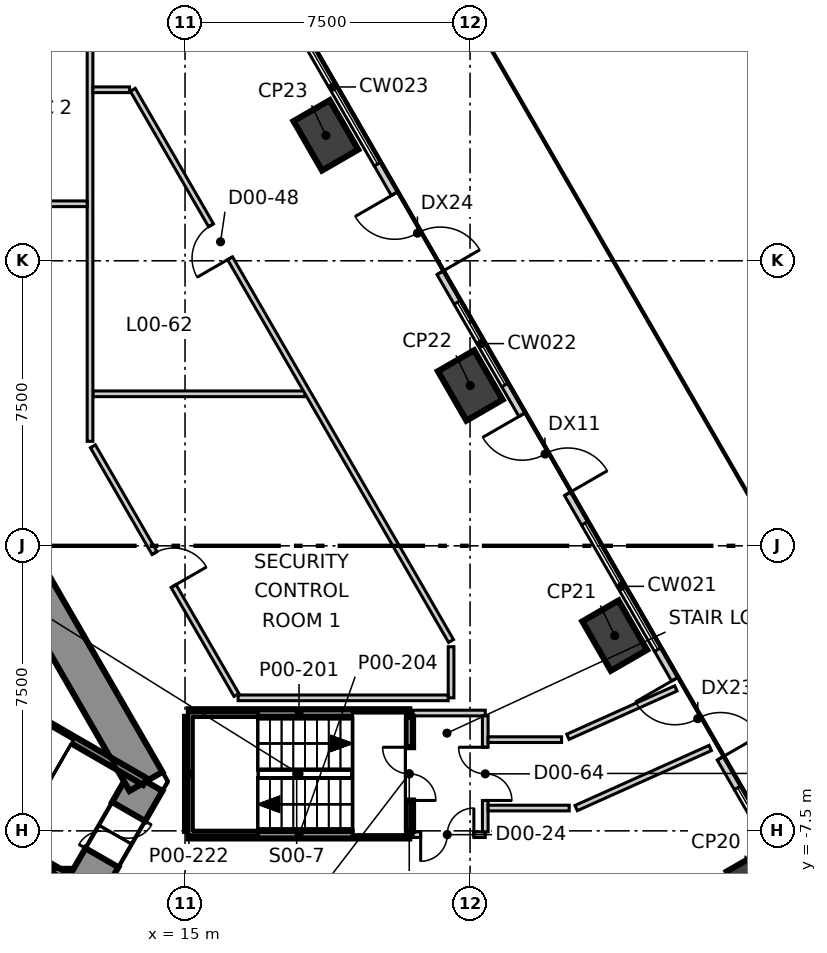
"""IFC4 building model, lengths in metres.
Left out: names, types, materials, properties, quantities, classifications, styles, units other than length and angle.
Written with IfcOpenShell. Run it as: python <this file> out.ifc"""

import sys

from ifc_helpers import new_model, si_unit, direction, frame, frame_2d, origin, origin_2d, place, context, subcontext, project, spatial, polyline, rectangle, outline, extrude, element, fill, save


model = new_model("IFC4")
c1 = context("Model", 3, precision=1e-05, world=origin(), true_north=direction((0.0, 1.0)))
c2 = subcontext(c1, "Body", "Model", "MODEL_VIEW")
j1 = project(units=[si_unit("LENGTHUNIT", "METRE"), si_unit("PLANEANGLEUNIT", "RADIAN")], contexts=[c1])
p1 = place(None, origin())
s1 = spatial("IfcSite", under=j1, at=p1, CompositionType="ELEMENT")
p2 = place(p1, origin())
s2 = spatial("IfcBuilding", under=s1, at=p2, CompositionType="ELEMENT")
p3 = place(p2, origin())
s3 = spatial("IfcBuildingStorey", under=s2, at=p3, CompositionType="ELEMENT", Elevation=0.0)
p4 = place(p3, frame((-12.355, -9.0, -0.4), z_axis=(0.0, 0.0, 1.0), x_axis=(1.0, 0.0, 0.0)))
e1 = element("IfcWall", 1, at=p4, inside=s3, PredefinedType="SHEAR", context=c2, shape_type="SweptSolid", body=[
    extrude(outline(polyline([(-0.289, -0.5), (1.656, -0.5), (3.601, -0.5), (5.547, -0.5), (7.492, -0.5), (9.437, -0.5), (11.382, -0.5), (13.328, -0.5), (15.273, -0.5), (17.218, -0.5), (19.163, -0.5), (21.109, -0.5), (23.054, -0.5), (24.999, -0.5), (24.422, 0.5), (22.566, 0.5), (20.709, 0.5), (18.853, 0.5), (16.996, 0.5), (15.14, 0.5), (13.283, 0.5), (11.427, 0.5), (9.57, 0.5), (7.714, 0.5), (5.857, 0.5), (4.001, 0.5), (2.145, 0.5), (0.288, 0.5), (-0.289, -0.5)])), origin(), (0.0, 0.0, 1.0), 8.5),
])
p5 = place(p3, frame((12.355, -9.0, -0.4), z_axis=(0.0, 0.0, 1.0), x_axis=(0.500077567175, 0.865980615723, 0.0)))
e2 = element("IfcWall", 2, at=p5, inside=s3, PredefinedType="SHEAR", context=c2, shape_type="SweptSolid", body=[
    extrude(outline(polyline([(-0.288, -0.5), (1.617, -0.5), (3.522, -0.5), (2.945, 0.5), (1.617, 0.5), (0.289, 0.499), (-0.288, -0.5)])), origin(), (0.0, 0.0, 1.0), 8.5),
])
p6 = place(p5, frame((0.917, 0.0, 0.4)))
e3 = element("IfcOpeningElement", 3, at=p6, cuts=e2, PredefinedType="OPENING", context=c2, shape_type="SweptSolid", body=[
    extrude(rectangle(XDim=1.4, YDim=2.1, at=frame_2d((0.7, 1.05))), frame((0.0, 0.51, 0.0), z_axis=(0.0, -1.0, 0.0), x_axis=(1.0, 0.0, 0.0)), (0.0, 0.0, 1.0), 1.02),
])
p7 = place(p3, frame((13.972, -6.2, -0.4), z_axis=(0.0, 0.0, 1.0), x_axis=(-0.499992141631, 0.866029940768, 0.0)))
e4 = element("IfcWall", 4, at=p7, inside=s3, PredefinedType="SHEAR", context=c2, shape_type="SweptSolid", body=[
    extrude(outline(polyline([(-0.288, -0.5), (1.657, -0.5), (3.602, -0.5), (5.547, -0.5), (7.493, -0.5), (9.438, -0.5), (11.383, -0.5), (13.328, -0.5), (15.273, -0.5), (17.218, -0.499), (19.164, -0.499), (21.109, -0.499), (23.054, -0.499), (24.999, -0.499), (24.422, 0.5), (22.566, 0.5), (20.709, 0.5), (18.853, 0.5), (16.996, 0.5), (15.14, 0.5), (13.283, 0.5), (11.427, 0.5), (9.57, 0.5), (7.714, 0.5), (5.857, 0.5), (4.001, 0.5), (2.145, 0.5), (0.288, 0.5), (-0.288, -0.5)])), origin(), (0.0, 0.0, 1.0), 8.5),
])
p8 = place(p7, frame((11.455, 0.0, 0.4)))
e5 = element("IfcOpeningElement", 5, at=p8, cuts=e4, PredefinedType="OPENING", context=c2, shape_type="SweptSolid", body=[
    extrude(rectangle(XDim=1.8, YDim=2.1, at=frame_2d((0.9, 1.05))), frame((0.0, 0.51, 0.0), z_axis=(0.0, -1.0, 0.0), x_axis=(1.0, 0.0, 0.0)), (0.0, 0.0, 1.0), 1.02),
])
for number, where, z_axis, x_axis in (
    (6, (30.105, -8.944, -0.4), (0.0, 0.0, 1.0), (-0.5, 0.866, 0.0)),
    (7, (26.306, -2.363, -0.4), (0.0, 0.0, 1.0), (-0.5, 0.866, 0.0)),
    (8, (22.506, 4.219, -0.4), (0.0, 0.0, 1.0), (-0.5, 0.866, 0.0)),
    (9, (18.706, 10.8, -0.4), (0.0, 0.0, 1.0), (-0.5, 0.866, 0.0)),
):
    element("IfcColumn", number, at=place(p3, frame(where, z_axis=z_axis, x_axis=x_axis)), inside=s3, PredefinedType="COLUMN", context=c2, shape_type="SweptSolid", body=[
        extrude(rectangle(XDim=1.5, YDim=1.1, at=origin_2d()), origin(), (0.0, 0.0, 1.0), 8.5),
    ])
p9 = place(p3, frame((29.541, -6.366, 0.0), z_axis=(0.0, 0.0, 1.0), x_axis=(-0.499952208475, 0.866052994476, 0.0)))
e10 = element("IfcWall", 10, at=p9, inside=s3, PredefinedType="ELEMENTEDWALL", context=c2, shape_type="SweptSolid", body=[
    extrude(rectangle(XDim=4.201, YDim=0.2, at=frame_2d((2.1, 0.0))), origin(), (0.0, 0.0, 1.0), 8.1),
])
p10 = place(p9, frame((0.9, 0.0, 0.0)))
e11 = element("IfcOpeningElement", 11, at=p10, cuts=e10, PredefinedType="OPENING", context=c2, shape_type="SweptSolid", body=[
    extrude(rectangle(XDim=2.4, YDim=3.2, at=frame_2d((1.2, 1.6))), frame((0.0, 0.11, 0.0), z_axis=(0.0, -1.0, 0.0), x_axis=(1.0, 0.0, 0.0)), (0.0, 0.0, 1.0), 0.22),
])
p11 = place(p3, frame((25.522, 0.595, 0.0), z_axis=(0.0, 0.0, 1.0), x_axis=(-0.499908613451, 0.866078159404, 0.0)))
e12 = element("IfcWall", 12, at=p11, inside=s3, PredefinedType="ELEMENTEDWALL", context=c2, shape_type="SweptSolid", body=[
    extrude(rectangle(XDim=4.2, YDim=0.2, at=frame_2d((2.1, 0.0))), origin(), (0.0, 0.0, 1.0), 8.1),
])
p12 = place(p11, frame((0.9, 0.0, 0.0)))
e13 = element("IfcOpeningElement", 13, at=p12, cuts=e12, PredefinedType="OPENING", context=c2, shape_type="SweptSolid", body=[
    extrude(rectangle(XDim=2.4, YDim=3.2, at=frame_2d((1.2, 1.6))), frame((0.0, 0.11, 0.0), z_axis=(0.0, -1.0, 0.0), x_axis=(1.0, 0.0, 0.0)), (0.0, 0.0, 1.0), 0.22),
])
p13 = place(p3, frame((22.166, 6.408, 0.0), z_axis=(0.0, 0.0, 1.0), x_axis=(-0.500052886544, 0.865994867571, 0.0)))
e14 = element("IfcWall", 14, at=p13, inside=s3, PredefinedType="ELEMENTEDWALL", context=c2, shape_type="SweptSolid", body=[
    extrude(rectangle(XDim=4.2, YDim=0.2, at=frame_2d((2.1, 0.0))), origin(), (0.0, 0.0, 1.0), 8.1),
])
p14 = place(p13, frame((0.9, 0.0, 0.0)))
e15 = element("IfcOpeningElement", 15, at=p14, cuts=e14, PredefinedType="OPENING", context=c2, shape_type="SweptSolid", body=[
    extrude(rectangle(XDim=2.4, YDim=3.2, at=frame_2d((1.2, 1.6))), frame((0.0, 0.11, 0.0), z_axis=(0.0, -1.0, 0.0), x_axis=(1.0, 0.0, 0.0)), (0.0, 0.0, 1.0), 0.22),
])
p15 = place(p3, frame((21.0, -7.6, 0.0), z_axis=(0.0, 0.0, 1.0), x_axis=(1.0, 0.0, 0.0)))
e16 = element("IfcWall", 16, at=p15, inside=s3, PredefinedType="PARTITIONING", context=c2, shape_type="SweptSolid", body=[
    extrude(rectangle(XDim=1.9, YDim=0.15, at=frame_2d((0.95, 0.0))), origin(), (0.0, 0.0, 1.0), 8.1),
])
p16 = place(p15, frame((0.2, 0.0, 0.0)))
e17 = element("IfcOpeningElement", 17, at=p16, cuts=e16, PredefinedType="OPENING", context=c2, shape_type="SweptSolid", body=[
    extrude(rectangle(XDim=1.4, YDim=2.1, at=frame_2d((0.7, 1.05))), frame((0.0, 0.085, 0.0), z_axis=(0.0, -1.0, 0.0), x_axis=(1.0, 0.0, 0.0)), (0.0, 0.0, 1.0), 0.17),
])
p17 = place(p3, frame((21.0, -4.4, 0.0), z_axis=(0.0, 0.0, 1.0), x_axis=(1.0, 0.0, 0.0)))
e18 = element("IfcWall", 18, at=p17, inside=s3, PredefinedType="PARTITIONING", context=c2, shape_type="SweptSolid", body=[
    extrude(rectangle(XDim=1.9, YDim=0.15, at=frame_2d((0.95, 0.0))), origin(), (0.0, 0.0, 1.0), 8.1),
])
p18 = place(p3, frame((22.9, -7.525, 0.0), z_axis=(0.0, 0.0, 1.0), x_axis=(0.0, 1.0, 0.0)))
e19 = element("IfcWall", 19, at=p18, inside=s3, PredefinedType="PARTITIONING", context=c2, shape_type="SweptSolid", body=[
    extrude(rectangle(XDim=3.05, YDim=0.15, at=frame_2d((1.525, 0.0))), origin(), (0.0, 0.0, 1.0), 8.1),
])
p19 = place(p18, frame((0.825, 0.0, 0.0)))
e20 = element("IfcOpeningElement", 20, at=p19, cuts=e19, PredefinedType="OPENING", context=c2, shape_type="SweptSolid", body=[
    extrude(rectangle(XDim=1.4, YDim=2.1, at=frame_2d((0.7, 1.05))), frame((0.0, 0.085, 0.0), z_axis=(0.0, -1.0, 0.0), x_axis=(1.0, 0.0, 0.0)), (0.0, 0.0, 1.0), 0.17),
])
p20 = place(p3, frame((25.292, -6.9, 0.0), z_axis=(0.0, 0.0, 1.0), x_axis=(0.912623058069, 0.408802096229, 0.0)))
e21 = element("IfcWall", 21, at=p20, inside=s3, PredefinedType="PARTITIONING", context=c2, shape_type="SweptSolid", body=[
    extrude(rectangle(XDim=3.867, YDim=0.15, at=frame_2d((1.934, 0.0))), origin(), (0.0, 0.0, 1.0), 8.1),
])
p21 = place(p3, frame((22.975, -6.9, 0.0), z_axis=(0.0, 0.0, 1.0), x_axis=(1.0, 0.0, 0.0)))
e22 = element("IfcWall", 22, at=p21, inside=s3, PredefinedType="PARTITIONING", context=c2, shape_type="SweptSolid", body=[
    extrude(rectangle(XDim=2.134, YDim=0.15, at=frame_2d((1.067, 0.0))), origin(), (0.0, 0.0, 1.0), 8.1),
])
p22 = place(p3, frame((22.975, -5.1, 0.0), z_axis=(0.0, 0.0, 1.0), x_axis=(1.0, 0.0, 0.0)))
e23 = element("IfcWall", 23, at=p22, inside=s3, PredefinedType="PARTITIONING", context=c2, shape_type="SweptSolid", body=[
    extrude(rectangle(XDim=1.933, YDim=0.15, at=frame_2d((0.966, 0.0))), origin(), (0.0, 0.0, 1.0), 8.1),
])
p23 = place(p3, frame((25.075, -5.025, 0.0), z_axis=(0.0, 0.0, 1.0), x_axis=(0.912585012315, 0.408887020212, 0.0)))
e24 = element("IfcWall", 24, at=p23, inside=s3, PredefinedType="PARTITIONING", context=c2, shape_type="SweptSolid", body=[
    extrude(rectangle(XDim=3.113, YDim=0.15, at=frame_2d((1.557, 0.0))), origin(), (0.0, 0.0, 1.0), 8.1),
])
p24 = place(p3, frame((12.575, 4.0, 0.0), z_axis=(0.0, 0.0, 1.0), x_axis=(1.0, 0.0, 0.0)))
e25 = element("IfcWall", 25, at=p24, inside=s3, PredefinedType="PARTITIONING", context=c2, shape_type="SweptSolid", body=[
    extrude(rectangle(XDim=5.583, YDim=0.15, at=frame_2d((2.792, 0.0))), origin(), (0.0, 0.0, 1.0), 8.1),
])
p25 = place(p3, frame((12.5, 2.749, 0.0), z_axis=(0.0, 0.0, 1.0), x_axis=(0.0, 1.0, 0.0)))
e26 = element("IfcWall", 26, at=p25, inside=s3, PredefinedType="PARTITIONING", context=c2, shape_type="SweptSolid", body=[
    extrude(rectangle(XDim=11.2, YDim=0.15, at=frame_2d((5.6, 0.0))), origin(), (0.0, 0.0, 1.0), 8.1),
])
p26 = place(p3, frame((13.625, 12.0, 0.0), z_axis=(0.0, 0.0, 1.0), x_axis=(0.500026956598, -0.866009839826, 0.0)))
e27 = element("IfcWall", 27, at=p26, inside=s3, PredefinedType="PARTITIONING", context=c2, shape_type="SweptSolid", body=[
    extrude(rectangle(XDim=16.749, YDim=0.15, at=frame_2d((8.375, 0.0))), origin(), (0.0, 0.0, 1.0), 8.1),
])
p27 = place(p26, frame((4.119, 0.0, 0.0)))
e28 = element("IfcOpeningElement", 28, at=p27, cuts=e27, PredefinedType="OPENING", context=c2, shape_type="SweptSolid", body=[
    extrude(rectangle(XDim=1.0, YDim=2.1, at=frame_2d((0.5, 1.05))), frame((0.0, 0.085, 0.0), z_axis=(0.0, -1.0, 0.0), x_axis=(1.0, 0.0, 0.0)), (0.0, 0.0, 1.0), 0.17),
])
p28 = place(p3, frame((22.0, -4.0, 0.0), z_axis=(0.0, 0.0, 1.0), x_axis=(0.0, 1.0, 0.0)))
e29 = element("IfcWall", 29, at=p28, inside=s3, PredefinedType="PARTITIONING", context=c2, shape_type="SweptSolid", body=[
    extrude(rectangle(XDim=1.345, YDim=0.15, at=frame_2d((0.672, 0.0))), origin(), (0.0, 0.0, 1.0), 8.1),
])
p29 = place(p3, frame((16.397, -4.0, 0.0), z_axis=(0.0, 0.0, 1.0), x_axis=(1.0, 0.0, 0.0)))
e30 = element("IfcWall", 30, at=p29, inside=s3, PredefinedType="PARTITIONING", context=c2, shape_type="SweptSolid", body=[
    extrude(rectangle(XDim=5.528, YDim=0.15, at=frame_2d((2.764, 0.0))), origin(), (0.0, 0.0, 1.0), 8.1),
])
p30 = place(p3, frame((12.575, 2.619, 0.0), z_axis=(0.0, 0.0, 1.0), x_axis=(0.499992812315, -0.866029553557, 0.0)))
e31 = element("IfcWall", 31, at=p30, inside=s3, PredefinedType="PARTITIONING", context=c2, shape_type="SweptSolid", body=[
    extrude(rectangle(XDim=7.556, YDim=0.15, at=frame_2d((3.778, 0.0))), origin(), (0.0, 0.0, 1.0), 8.1),
])
p31 = place(p30, frame((3.246, 0.0, 0.0)))
e32 = element("IfcOpeningElement", 32, at=p31, cuts=e31, PredefinedType="OPENING", context=c2, shape_type="SweptSolid", body=[
    extrude(rectangle(XDim=1.0, YDim=2.1, at=frame_2d((0.5, 1.05))), frame((0.0, 0.085, 0.0), z_axis=(0.0, -1.0, 0.0), x_axis=(1.0, 0.0, 0.0)), (0.0, 0.0, 1.0), 0.17),
])
p32 = place(p3, frame((8.978, 9.0, 0.0), z_axis=(0.0, 0.0, 1.0), x_axis=(1.0, 0.0, 0.0)))
e33 = element("IfcWall", 33, at=p32, inside=s3, PredefinedType="PARTITIONING", context=c2, shape_type="SweptSolid", body=[
    extrude(rectangle(XDim=3.447, YDim=0.15, at=frame_2d((1.724, 0.0))), origin(), (0.0, 0.0, 1.0), 8.1),
])
p33 = place(p3, frame((12.575, 12.0, 0.0), z_axis=(0.0, 0.0, 1.0), x_axis=(1.0, 0.0, 0.0)))
e34 = element("IfcWall", 34, at=p33, inside=s3, PredefinedType="PARTITIONING", context=c2, shape_type="SweptSolid", body=[
    extrude(rectangle(XDim=0.964, YDim=0.15, at=frame_2d((0.482, 0.0))), origin(), (0.0, 0.0, 1.0), 8.1),
])
p34 = place(p3, frame((6.529, -1.922, 0.0), z_axis=(0.0, 0.0, 1.0), x_axis=(0.866036527536, -0.499980732602, 0.0)))
e35 = element("IfcWall", 35, at=p34, inside=s3, PredefinedType="SOLIDWALL", context=c2, shape_type="SweptSolid", body=[
    extrude(rectangle(XDim=8.564, YDim=0.2, at=frame_2d((4.282, 0.0))), origin(), (0.0, 0.0, 1.0), 8.1),
])
p35 = place(p3, frame((4.929, -4.693, 0.0), z_axis=(0.0, 0.0, 1.0), x_axis=(0.865987152174, -0.50006624788, 0.0)))
e36 = element("IfcWall", 36, at=p35, inside=s3, PredefinedType="SOLIDWALL", context=c2, shape_type="SweptSolid", body=[
    extrude(rectangle(XDim=8.565, YDim=0.2, at=frame_2d((4.282, 0.0))), origin(), (0.0, 0.0, 1.0), 8.1),
])
for number, where, z_axis, x_axis in (
    (37, (15.1, -4.4, 0.0), (0.0, 0.0, 1.0), (1.0, 0.0, 0.0)),
    (38, (15.1, -7.6, 0.0), (0.0, 0.0, 1.0), (1.0, 0.0, 0.0)),
):
    element("IfcWall", number, at=place(p3, frame(where, z_axis=z_axis, x_axis=x_axis)), inside=s3, PredefinedType="SOLIDWALL", context=c2, shape_type="SweptSolid", body=[
        extrude(rectangle(XDim=5.8, YDim=0.2, at=frame_2d((2.9, 0.0))), origin(), (0.0, 0.0, 1.0), 8.1),
    ])
p36 = place(p3, frame((20.9, -7.5, 0.0), z_axis=(0.0, 0.0, 1.0), x_axis=(0.0, 1.0, 0.0)))
e39 = element("IfcWall", 39, at=p36, inside=s3, PredefinedType="SOLIDWALL", context=c2, shape_type="SweptSolid", body=[
    extrude(rectangle(XDim=3.0, YDim=0.2, at=frame_2d((1.5, 0.0))), origin(), (0.0, 0.0, 1.0), 8.1),
])
p37 = place(p36, frame((0.8, 0.0, 0.0)))
e40 = element("IfcOpeningElement", 40, at=p37, cuts=e39, PredefinedType="OPENING", context=c2, shape_type="SweptSolid", body=[
    extrude(rectangle(XDim=1.4, YDim=2.1, at=frame_2d((0.7, 1.05))), frame((0.0, 0.11, 0.0), z_axis=(0.0, -1.0, 0.0), x_axis=(1.0, 0.0, 0.0)), (0.0, 0.0, 1.0), 0.22),
])
p38 = place(p3, frame((15.1, -7.5, 0.0), z_axis=(0.0, 0.0, 1.0), x_axis=(0.0, 1.0, 0.0)))
e41 = element("IfcWall", 41, at=p38, inside=s3, PredefinedType="SOLIDWALL", context=c2, shape_type="SweptSolid", body=[
    extrude(rectangle(XDim=3.0, YDim=0.2, at=frame_2d((1.5, 0.0))), origin(), (0.0, 0.0, 1.0), 8.1),
])
p39 = place(p10, frame((2.4, 0.0, 0.0), z_axis=(0.0, 0.0, 1.0), x_axis=(-1.0, 0.0, 0.0)))
e42 = element("IfcDoor", 42, at=p39, inside=s3, OperationType="DOUBLE_DOOR_SINGLE_SWING", PredefinedType="DOOR", context=c2, shape_type="SweptSolid", body=[
    extrude(rectangle(XDim=2.4, YDim=3.2, at=frame_2d((1.2, 1.6))), frame((0.0, 0.025, 0.0), z_axis=(0.0, -1.0, 0.0), x_axis=(1.0, 0.0, 0.0)), (0.0, 0.0, 1.0), 0.05),
])
fill(e11, e42)
p40 = place(p12, frame((2.4, 0.0, 0.0), z_axis=(0.0, 0.0, 1.0), x_axis=(-1.0, 0.0, 0.0)))
e43 = element("IfcDoor", 43, at=p40, inside=s3, OperationType="DOUBLE_DOOR_SINGLE_SWING", PredefinedType="DOOR", context=c2, shape_type="SweptSolid", body=[
    extrude(rectangle(XDim=2.4, YDim=3.2, at=frame_2d((1.2, 1.6))), frame((0.0, 0.025, 0.0), z_axis=(0.0, -1.0, 0.0), x_axis=(1.0, 0.0, 0.0)), (0.0, 0.0, 1.0), 0.05),
])
fill(e13, e43)
p41 = place(p14, frame((2.4, 0.0, 0.0), z_axis=(0.0, 0.0, 1.0), x_axis=(-1.0, 0.0, 0.0)))
e44 = element("IfcDoor", 44, at=p41, inside=s3, OperationType="DOUBLE_DOOR_SINGLE_SWING", PredefinedType="DOOR", context=c2, shape_type="SweptSolid", body=[
    extrude(rectangle(XDim=2.4, YDim=3.2, at=frame_2d((1.2, 1.6))), frame((0.0, 0.025, 0.0), z_axis=(0.0, -1.0, 0.0), x_axis=(1.0, 0.0, 0.0)), (0.0, 0.0, 1.0), 0.05),
])
fill(e15, e44)
p42 = place(p37, origin())
e45 = element("IfcDoor", 45, at=p42, inside=s3, OperationType="DOUBLE_DOOR_SINGLE_SWING", PredefinedType="DOOR", context=c2, shape_type="SweptSolid", body=[
    extrude(rectangle(XDim=1.4, YDim=2.1, at=frame_2d((0.7, 1.05))), frame((0.0, 0.025, 0.0), z_axis=(0.0, -1.0, 0.0), x_axis=(1.0, 0.0, 0.0)), (0.0, 0.0, 1.0), 0.05),
])
fill(e40, e45)
p43 = place(p16, origin())
e46 = element("IfcDoor", 46, at=p43, inside=s3, OperationType="DOUBLE_DOOR_SINGLE_SWING", PredefinedType="DOOR", context=c2, shape_type="SweptSolid", body=[
    extrude(rectangle(XDim=1.4, YDim=2.1, at=frame_2d((0.7, 1.05))), frame((0.0, 0.025, 0.0), z_axis=(0.0, -1.0, 0.0), x_axis=(1.0, 0.0, 0.0)), (0.0, 0.0, 1.0), 0.05),
])
fill(e17, e46)
p44 = place(p31, origin())
e47 = element("IfcDoor", 47, at=p44, inside=s3, OperationType="SINGLE_SWING_LEFT", PredefinedType="DOOR", context=c2, shape_type="SweptSolid", body=[
    extrude(rectangle(XDim=1.0, YDim=2.1, at=frame_2d((0.5, 1.05))), frame((0.0, 0.025, 0.0), z_axis=(0.0, -1.0, 0.0), x_axis=(1.0, 0.0, 0.0)), (0.0, 0.0, 1.0), 0.05),
])
fill(e32, e47)
p45 = place(p27, origin())
e48 = element("IfcDoor", 48, at=p45, inside=s3, OperationType="SINGLE_SWING_RIGHT", PredefinedType="DOOR", context=c2, shape_type="SweptSolid", body=[
    extrude(rectangle(XDim=1.0, YDim=2.1, at=frame_2d((0.5, 1.05))), frame((0.0, 0.025, 0.0), z_axis=(0.0, -1.0, 0.0), x_axis=(1.0, 0.0, 0.0)), (0.0, 0.0, 1.0), 0.05),
])
fill(e28, e48)
p46 = place(p6, origin())
e49 = element("IfcDoor", 49, at=p46, inside=s3, OperationType="DOUBLE_DOOR_SINGLE_SWING", PredefinedType="DOOR", context=c2, shape_type="SweptSolid", body=[
    extrude(rectangle(XDim=1.4, YDim=2.1, at=frame_2d((0.7, 1.05))), frame((0.0, 0.025, 0.0), z_axis=(0.0, -1.0, 0.0), x_axis=(1.0, 0.0, 0.0)), (0.0, 0.0, 1.0), 0.05),
])
fill(e3, e49)
p47 = place(p19, origin())
e50 = element("IfcDoor", 50, at=p47, inside=s3, OperationType="DOUBLE_DOOR_SINGLE_SWING", PredefinedType="DOOR", context=c2, shape_type="SweptSolid", body=[
    extrude(rectangle(XDim=1.4, YDim=2.1, at=frame_2d((0.7, 1.05))), frame((0.0, 0.025, 0.0), z_axis=(0.0, -1.0, 0.0), x_axis=(1.0, 0.0, 0.0)), (0.0, 0.0, 1.0), 0.05),
])
fill(e20, e50)
save(model, sys.argv[1])
